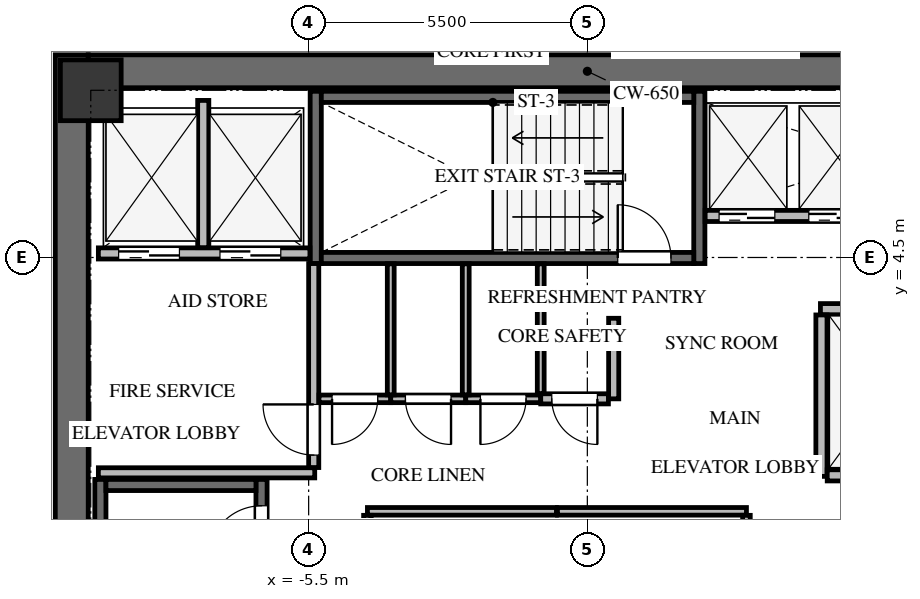
"""IFC4 building model, lengths in metres.
Left out: names, types, materials, properties, quantities, classifications, styles, units other than length and angle.
Written with IfcOpenShell. Run it as: python <this file> out.ifc"""

import sys

from ifc_helpers import new_model, si_unit, direction, frame, frame_2d, origin, origin_2d, place, context, subcontext, project, spatial, rectangle, extrude, source, transform, mapped, element, fill, save


model = new_model("IFC4")
c1 = context("Model", 3, precision=1e-05, world=origin(), true_north=direction((0.0, 1.0)))
c2 = subcontext(c1, "Body", "Model", "MODEL_VIEW")
j1 = project(units=[si_unit("LENGTHUNIT", "METRE"), si_unit("PLANEANGLEUNIT", "RADIAN")], contexts=[c1])
p1 = place(None, origin())
s1 = spatial("IfcSite", under=j1, at=p1, CompositionType="ELEMENT")
p2 = place(p1, origin())
s2 = spatial("IfcBuilding", under=s1, at=p2, CompositionType="ELEMENT")
p3 = place(p2, frame((0.0, 0.0, 193.6)))
s3 = spatial("IfcBuildingStorey", under=s2, at=p3, CompositionType="ELEMENT", Elevation=193.6)
p4 = place(p3, frame((-10.175, -8.5, 0.0), z_axis=(0.0, 0.0, 1.0), x_axis=(0.0, 1.0, 0.0)))
e1 = element("IfcWall", 1, at=p4, inside=s3, PredefinedType="SHEAR", context=c2, shape_type="SweptSolid", body=[
    extrude(rectangle(XDim=17.0, YDim=0.65, at=frame_2d((8.5, 0.0))), origin(), (0.0, 0.0, 1.0), 3.3),
])
p5 = place(p3, frame((-9.85, 8.175, 0.0), z_axis=(0.0, 0.0, 1.0), x_axis=(1.0, 0.0, 0.0)))
e2 = element("IfcWall", 2, at=p5, inside=s3, PredefinedType="SHEAR", context=c2, shape_type="SweptSolid", body=[
    extrude(rectangle(XDim=19.7, YDim=0.65, at=frame_2d((9.85, 0.0))), origin(), (0.0, 0.0, 1.0), 3.3),
])
p6 = place(p3, frame((-6.43, -7.77, -0.24), z_axis=(0.0, 0.0, 1.0), x_axis=(0.0, 1.0, 0.0)))
e3 = element("IfcWall", 3, at=p6, inside=s3, PredefinedType="SHEAR", context=c2, shape_type="SweptSolid", body=[
    extrude(rectangle(XDim=7.89, YDim=0.22, at=frame_2d((3.945, 0.0))), origin(), (0.0, 0.0, 1.0), 3.3),
])
p7 = place(p6, frame((6.32, 0.0, 0.0)))
e4 = element("IfcOpeningElement", 4, at=p7, cuts=e3, PredefinedType="OPENING", context=c2, shape_type="SweptSolid", body=[
    extrude(rectangle(XDim=1.05, YDim=2.15, at=frame_2d((0.525, 1.075))), frame((0.0, 0.12, 0.0), z_axis=(0.0, -1.0, 0.0), x_axis=(1.0, 0.0, 0.0)), (0.0, 0.0, 1.0), 0.24),
])
p8 = place(p3, frame((-9.61, 0.12, -0.24), z_axis=(0.0, 0.0, 1.0), x_axis=(0.0, -1.0, 0.0)))
e5 = element("IfcWall", 5, at=p8, inside=s3, PredefinedType="SHEAR", context=c2, shape_type="SweptSolid", body=[
    extrude(rectangle(XDim=7.89, YDim=0.22, at=frame_2d((3.945, 0.0))), origin(), (0.0, 0.0, 1.0), 3.3),
])
p9 = place(p3, frame((-6.54, 0.01, -0.24), z_axis=(0.0, 0.0, 1.0), x_axis=(-1.0, 0.0, 0.0)))
e6 = element("IfcWall", 6, at=p9, inside=s3, PredefinedType="SHEAR", context=c2, shape_type="SweptSolid", body=[
    extrude(rectangle(XDim=2.96, YDim=0.22, at=frame_2d((1.48, 0.0))), origin(), (0.0, 0.0, 1.0), 3.3),
])
for number, where, z_axis, x_axis in (
    (7, (2.21, 4.38, -0.24), (0.0, 0.0, 1.0), (0.0, 1.0, 0.0)),
    (8, (-5.36, 7.78, -0.24), (0.0, 0.0, 1.0), (0.0, -1.0, 0.0)),
):
    element("IfcWall", number, at=place(p3, frame(where, z_axis=z_axis, x_axis=x_axis)), inside=s3, PredefinedType="SHEAR", context=c2, shape_type="SweptSolid", body=[
        extrude(rectangle(XDim=3.4, YDim=0.22, at=frame_2d((1.7, 0.0))), origin(), (0.0, 0.0, 1.0), 3.3),
    ])
p10 = place(p3, frame((-5.25, 4.49, -0.24), z_axis=(0.0, 0.0, 1.0), x_axis=(1.0, 0.0, 0.0)))
e9 = element("IfcWall", 9, at=p10, inside=s3, PredefinedType="SHEAR", context=c2, shape_type="SweptSolid", body=[
    extrude(rectangle(XDim=7.35, YDim=0.22, at=frame_2d((3.675, 0.0))), origin(), (0.0, 0.0, 1.0), 3.3),
])
p11 = place(p10, frame((5.85, 0.0, 0.0)))
e10 = element("IfcOpeningElement", 10, at=p11, cuts=e9, PredefinedType="OPENING", context=c2, shape_type="SweptSolid", body=[
    extrude(rectangle(XDim=1.05, YDim=2.15, at=frame_2d((0.525, 1.075))), frame((0.0, 0.12, 0.0), z_axis=(0.0, -1.0, 0.0), x_axis=(1.0, 0.0, 0.0)), (0.0, 0.0, 1.0), 0.24),
])
p12 = place(p3, frame((2.1, 7.67, -0.24), z_axis=(0.0, 0.0, 1.0), x_axis=(-1.0, 0.0, 0.0)))
e11 = element("IfcWall", 11, at=p12, inside=s3, PredefinedType="SHEAR", context=c2, shape_type="SweptSolid", body=[
    extrude(rectangle(XDim=7.35, YDim=0.22, at=frame_2d((3.675, 0.0))), origin(), (0.0, 0.0, 1.0), 3.3),
])
m1 = source(origin(), c2, "Body", "SweptSolid", [
    extrude(rectangle(XDim=1.2, YDim=1.2, at=origin_2d()), origin(), (0.0, 0.0, 1.0), 3.3),
])
p13 = place(p3, frame((-9.8, 7.8, -0.24), z_axis=(0.0, 0.0, 1.0), x_axis=(1.0, 0.0, 0.0)))
e12 = element("IfcColumn", 12, at=p13, inside=s3, PredefinedType="COLUMN", context=c2, shape_type="MappedRepresentation", body=[
    mapped(m1, transform((0.0, 0.0, 0.0), x_axis=(1.0, 0.0, 0.0), y_axis=(0.0, 1.0, 0.0), z_axis=(0.0, 0.0, 1.0), scale=1.0)),
])
p14 = place(p3, frame((-9.65, 4.58, 0.0), z_axis=(0.0, 0.0, 1.0), x_axis=(1.0, 0.0, 0.0)))
e13 = element("IfcWall", 13, at=p14, inside=s3, PredefinedType="SOLIDWALL", context=c2, shape_type="SweptSolid", body=[
    extrude(rectangle(XDim=4.175, YDim=0.22, at=frame_2d((2.087, 0.0))), origin(), (0.0, 0.0, 1.0), 3.045),
])
p15 = place(p14, frame((0.4, 0.0, 0.0)))
e14 = element("IfcOpeningElement", 14, at=p15, cuts=e13, PredefinedType="OPENING", context=c2, shape_type="SweptSolid", body=[
    extrude(rectangle(XDim=1.2, YDim=2.15, at=frame_2d((0.6, 1.075))), frame((0.0, 0.12, 0.0), z_axis=(0.0, -1.0, 0.0), x_axis=(1.0, 0.0, 0.0)), (0.0, 0.0, 1.0), 0.24),
])
p16 = place(p14, frame((2.4, 0.0, 0.0)))
e15 = element("IfcOpeningElement", 15, at=p16, cuts=e13, PredefinedType="OPENING", context=c2, shape_type="SweptSolid", body=[
    extrude(rectangle(XDim=1.2, YDim=2.15, at=frame_2d((0.6, 1.075))), frame((0.0, 0.12, 0.0), z_axis=(0.0, -1.0, 0.0), x_axis=(1.0, 0.0, 0.0)), (0.0, 0.0, 1.0), 0.24),
])
p17 = place(p3, frame((-7.58, 4.694, 0.0), z_axis=(0.0, 0.0, 1.0), x_axis=(0.0, 1.0, 0.0)))
e16 = element("IfcWall", 16, at=p17, inside=s3, PredefinedType="SOLIDWALL", context=c2, shape_type="SweptSolid", body=[
    extrude(rectangle(XDim=2.906, YDim=0.22, at=frame_2d((1.453, 0.0))), origin(), (0.0, 0.0, 1.0), 3.045),
])
p18 = place(p3, frame((-9.65, 0.25, 0.0), z_axis=(0.0, 0.0, 1.0), x_axis=(1.0, 0.0, 0.0)))
e17 = element("IfcWall", 17, at=p18, inside=s3, PredefinedType="SOLIDWALL", context=c2, shape_type="SweptSolid", body=[
    extrude(rectangle(XDim=4.27, YDim=0.2, at=frame_2d((2.135, 0.0))), origin(), (0.0, 0.0, 1.0), 3.045),
])
p19 = place(p3, frame((-5.4, 0.354, 0.0), z_axis=(0.0, 0.0, 1.0), x_axis=(0.0, 1.0, 0.0)))
e18 = element("IfcWall", 18, at=p19, inside=s3, PredefinedType="SOLIDWALL", context=c2, shape_type="SweptSolid", body=[
    extrude(rectangle(XDim=4.026, YDim=0.2, at=frame_2d((2.013, 0.0))), origin(), (0.0, 0.0, 1.0), 3.045),
])
p20 = place(p19, frame((0.246, 0.0, 0.0)))
e19 = element("IfcOpeningElement", 19, at=p20, cuts=e18, PredefinedType="OPENING", context=c2, shape_type="SweptSolid", body=[
    extrude(rectangle(XDim=1.0, YDim=2.15, at=frame_2d((0.5, 1.075))), frame((0.0, 0.11, 0.0), z_axis=(0.0, -1.0, 0.0), x_axis=(1.0, 0.0, 0.0)), (0.0, 0.0, 1.0), 0.22),
])
p21 = place(p3, frame((4.6, 3.48, 0.0), z_axis=(0.0, 0.0, 1.0), x_axis=(1.0, 0.0, 0.0)))
e20 = element("IfcWall", 20, at=p21, inside=s3, PredefinedType="SOLIDWALL", context=c2, shape_type="SweptSolid", body=[
    extrude(rectangle(XDim=5.05, YDim=0.22, at=frame_2d((2.525, 0.0))), origin(), (0.0, 0.0, 1.0), 3.045),
])
p22 = place(p21, frame((0.55, 0.0, 0.0)))
e21 = element("IfcOpeningElement", 21, at=p22, cuts=e20, PredefinedType="OPENING", context=c2, shape_type="SweptSolid", body=[
    extrude(rectangle(XDim=1.4, YDim=2.15, at=frame_2d((0.7, 1.075))), frame((0.0, 0.12, 0.0), z_axis=(0.0, -1.0, 0.0), x_axis=(1.0, 0.0, 0.0)), (0.0, 0.0, 1.0), 0.24),
])
p23 = place(p21, frame((3.05, 0.0, 0.0)))
e22 = element("IfcOpeningElement", 22, at=p23, cuts=e20, PredefinedType="OPENING", context=c2, shape_type="SweptSolid", body=[
    extrude(rectangle(XDim=1.4, YDim=2.15, at=frame_2d((0.7, 1.075))), frame((0.0, 0.12, 0.0), z_axis=(0.0, -1.0, 0.0), x_axis=(1.0, 0.0, 0.0)), (0.0, 0.0, 1.0), 0.24),
])
p24 = place(p3, frame((4.62, 0.18, 0.0), z_axis=(0.0, 0.0, 1.0), x_axis=(0.0, 1.0, 0.0)))
e23 = element("IfcWall", 23, at=p24, inside=s3, PredefinedType="SOLIDWALL", context=c2, shape_type="SweptSolid", body=[
    extrude(rectangle(XDim=3.186, YDim=0.22, at=frame_2d((1.593, 0.0))), origin(), (0.0, 0.0, 1.0), 3.045),
])
p25 = place(p3, frame((4.734, 0.2, 0.0), z_axis=(0.0, 0.0, 1.0), x_axis=(1.0, 0.0, 0.0)))
e24 = element("IfcWall", 24, at=p25, inside=s3, PredefinedType="SOLIDWALL", context=c2, shape_type="SweptSolid", body=[
    extrude(rectangle(XDim=1.666, YDim=0.22, at=frame_2d((0.833, 0.0))), origin(), (0.0, 0.0, 1.0), 3.045),
])
p26 = place(p3, frame((2.325, 5.32, 0.0), z_axis=(0.0, 0.0, 1.0), x_axis=(1.0, 0.0, 0.0)))
e25 = element("IfcWall", 25, at=p26, inside=s3, PredefinedType="SOLIDWALL", context=c2, shape_type="SweptSolid", body=[
    extrude(rectangle(XDim=7.325, YDim=0.22, at=frame_2d((3.663, 0.0))), origin(), (0.0, 0.0, 1.0), 3.045),
])
p27 = place(p26, frame((0.275, 0.0, 0.0)))
e26 = element("IfcOpeningElement", 26, at=p27, cuts=e25, PredefinedType="OPENING", context=c2, shape_type="SweptSolid", body=[
    extrude(rectangle(XDim=1.1, YDim=2.15, at=frame_2d((0.55, 1.075))), frame((0.0, 0.12, 0.0), z_axis=(0.0, -1.0, 0.0), x_axis=(1.0, 0.0, 0.0)), (0.0, 0.0, 1.0), 0.24),
])
p28 = place(p26, frame((2.045, 0.0, 0.0)))
e27 = element("IfcOpeningElement", 27, at=p28, cuts=e25, PredefinedType="OPENING", context=c2, shape_type="SweptSolid", body=[
    extrude(rectangle(XDim=1.1, YDim=2.15, at=frame_2d((0.55, 1.075))), frame((0.0, 0.12, 0.0), z_axis=(0.0, -1.0, 0.0), x_axis=(1.0, 0.0, 0.0)), (0.0, 0.0, 1.0), 0.24),
])
p29 = place(p26, frame((3.815, 0.0, 0.0)))
e28 = element("IfcOpeningElement", 28, at=p29, cuts=e25, PredefinedType="OPENING", context=c2, shape_type="SweptSolid", body=[
    extrude(rectangle(XDim=1.1, YDim=2.15, at=frame_2d((0.55, 1.075))), frame((0.0, 0.12, 0.0), z_axis=(0.0, -1.0, 0.0), x_axis=(1.0, 0.0, 0.0)), (0.0, 0.0, 1.0), 0.24),
])
p30 = place(p26, frame((5.585, 0.0, 0.0)))
e29 = element("IfcOpeningElement", 29, at=p30, cuts=e25, PredefinedType="OPENING", context=c2, shape_type="SweptSolid", body=[
    extrude(rectangle(XDim=1.1, YDim=2.15, at=frame_2d((0.55, 1.075))), frame((0.0, 0.12, 0.0), z_axis=(0.0, -1.0, 0.0), x_axis=(1.0, 0.0, 0.0)), (0.0, 0.0, 1.0), 0.24),
])
p31 = place(p3, frame((-4.34, -0.51, 0.0), z_axis=(0.0, 0.0, 1.0), x_axis=(1.0, 0.0, 0.0)))
e30 = element("IfcWall", 30, at=p31, inside=s3, PredefinedType="PARTITIONING", context=c2, shape_type="SweptSolid", body=[
    extrude(rectangle(XDim=3.73, YDim=0.15, at=frame_2d((1.865, 0.0))), origin(), (0.0, 0.0, 1.0), 3.045),
])
p32 = place(p3, frame((-4.34, -2.961, 0.0), z_axis=(0.0, 0.0, 1.0), x_axis=(0.0, 1.0, 0.0)))
e31 = element("IfcWall", 31, at=p32, inside=s3, PredefinedType="PARTITIONING", context=c2, shape_type="SweptSolid", body=[
    extrude(rectangle(XDim=2.372, YDim=0.15, at=frame_2d((1.186, 0.0))), origin(), (0.0, 0.0, 1.0), 3.045),
])
p33 = place(p3, frame((-0.59, -0.51, 0.0), z_axis=(0.0, 0.0, 1.0), x_axis=(1.0, 0.0, 0.0)))
e32 = element("IfcWall", 32, at=p33, inside=s3, PredefinedType="PARTITIONING", context=c2, shape_type="SweptSolid", body=[
    extrude(rectangle(XDim=3.73, YDim=0.15, at=frame_2d((1.865, 0.0))), origin(), (0.0, 0.0, 1.0), 3.045),
])
p34 = place(p3, frame((3.14, -0.589, 0.0), z_axis=(0.0, 0.0, 1.0), x_axis=(0.0, -1.0, 0.0)))
e33 = element("IfcWall", 33, at=p34, inside=s3, PredefinedType="PARTITIONING", context=c2, shape_type="SweptSolid", body=[
    extrude(rectangle(XDim=2.372, YDim=0.15, at=frame_2d((1.186, 0.0))), origin(), (0.0, 0.0, 1.0), 3.045),
])
p35 = place(p3, frame((-3.88, 1.71, 0.0), z_axis=(0.0, 0.0, 1.0), x_axis=(-1.0, 0.0, 0.0)))
e34 = element("IfcWall", 34, at=p35, inside=s3, PredefinedType="PARTITIONING", context=c2, shape_type="SweptSolid", body=[
    extrude(rectangle(XDim=1.416, YDim=0.15, at=frame_2d((0.708, 0.0))), origin(), (0.0, 0.0, 1.0), 3.045),
])
p36 = place(p35, frame((0.258, 0.0, 0.0)))
e35 = element("IfcOpeningElement", 35, at=p36, cuts=e34, PredefinedType="OPENING", context=c2, shape_type="SweptSolid", body=[
    extrude(rectangle(XDim=0.9, YDim=2.05, at=frame_2d((0.45, 1.025))), frame((0.0, 0.085, 0.0), z_axis=(0.0, -1.0, 0.0), x_axis=(1.0, 0.0, 0.0)), (0.0, 0.0, 1.0), 0.17),
])
p37 = place(p3, frame((-2.4, 1.71, 0.0), z_axis=(0.0, 0.0, 1.0), x_axis=(-1.0, 0.0, 0.0)))
e36 = element("IfcWall", 36, at=p37, inside=s3, PredefinedType="PARTITIONING", context=c2, shape_type="SweptSolid", body=[
    extrude(rectangle(XDim=1.48, YDim=0.15, at=frame_2d((0.74, 0.0))), origin(), (0.0, 0.0, 1.0), 3.045),
])
p38 = place(p37, frame((0.29, 0.0, 0.0)))
e37 = element("IfcOpeningElement", 37, at=p38, cuts=e36, PredefinedType="OPENING", context=c2, shape_type="SweptSolid", body=[
    extrude(rectangle(XDim=0.9, YDim=2.05, at=frame_2d((0.45, 1.025))), frame((0.0, 0.085, 0.0), z_axis=(0.0, -1.0, 0.0), x_axis=(1.0, 0.0, 0.0)), (0.0, 0.0, 1.0), 0.17),
])
p39 = place(p3, frame((-0.92, 1.71, 0.0), z_axis=(0.0, 0.0, 1.0), x_axis=(-1.0, 0.0, 0.0)))
e38 = element("IfcWall", 38, at=p39, inside=s3, PredefinedType="PARTITIONING", context=c2, shape_type="SweptSolid", body=[
    extrude(rectangle(XDim=1.48, YDim=0.15, at=frame_2d((0.74, 0.0))), origin(), (0.0, 0.0, 1.0), 3.045),
])
p40 = place(p39, frame((0.29, 0.0, 0.0)))
e39 = element("IfcOpeningElement", 39, at=p40, cuts=e38, PredefinedType="OPENING", context=c2, shape_type="SweptSolid", body=[
    extrude(rectangle(XDim=0.9, YDim=2.05, at=frame_2d((0.45, 1.025))), frame((0.0, 0.085, 0.0), z_axis=(0.0, -1.0, 0.0), x_axis=(1.0, 0.0, 0.0)), (0.0, 0.0, 1.0), 0.17),
])
p41 = place(p3, frame((0.52, 3.3, 0.0), z_axis=(0.0, 0.0, 1.0), x_axis=(0.0, -1.0, 0.0)))
e40 = element("IfcWall", 40, at=p41, inside=s3, PredefinedType="SOLIDWALL", context=c2, shape_type="SweptSolid", body=[
    extrude(rectangle(XDim=1.59, YDim=0.2, at=frame_2d((0.795, 0.0))), origin(), (0.0, 0.0, 1.0), 3.045),
])
p42 = place(p3, frame((0.416, 1.71, 0.0), z_axis=(0.0, 0.0, 1.0), x_axis=(-1.0, 0.0, 0.0)))
e41 = element("IfcWall", 41, at=p42, inside=s3, PredefinedType="SOLIDWALL", context=c2, shape_type="SweptSolid", body=[
    extrude(rectangle(XDim=1.336, YDim=0.2, at=frame_2d((0.668, 0.0))), origin(), (0.0, 0.0, 1.0), 3.045),
])
p43 = place(p42, frame((0.218, 0.0, 0.0)))
e42 = element("IfcOpeningElement", 42, at=p43, cuts=e41, PredefinedType="OPENING", context=c2, shape_type="SweptSolid", body=[
    extrude(rectangle(XDim=0.9, YDim=2.05, at=frame_2d((0.45, 1.025))), frame((0.0, 0.11, 0.0), z_axis=(0.0, -1.0, 0.0), x_axis=(1.0, 0.0, 0.0)), (0.0, 0.0, 1.0), 0.22),
])
for number, where, z_axis, x_axis in (
    (43, (-3.88, 4.375, 0.0), (0.0, 0.0, 1.0), (0.0, -1.0, 0.0)),
    (44, (-2.4, 4.375, 0.0), (0.0, 0.0, 1.0), (0.0, -1.0, 0.0)),
):
    element("IfcWall", number, at=place(p3, frame(where, z_axis=z_axis, x_axis=x_axis)), inside=s3, PredefinedType="PARTITIONING", context=c2, shape_type="SweptSolid", body=[
        extrude(rectangle(XDim=2.586, YDim=0.135, at=frame_2d((1.293, 0.0))), origin(), (0.0, 0.0, 1.0), 3.045),
    ])
p44 = place(p3, frame((-0.92, 4.375, 0.0), z_axis=(0.0, 0.0, 1.0), x_axis=(0.0, -1.0, 0.0)))
e45 = element("IfcWall", 45, at=p44, inside=s3, PredefinedType="PARTITIONING", context=c2, shape_type="SweptSolid", body=[
    extrude(rectangle(XDim=2.561, YDim=0.135, at=frame_2d((1.281, 0.0))), origin(), (0.0, 0.0, 1.0), 3.045),
])
m2 = source(origin(), c2, "Body", "SweptSolid", [
    extrude(rectangle(XDim=1.05, YDim=2.15, at=frame_2d((0.525, 1.075))), frame((0.0, 0.025, 0.0), z_axis=(0.0, -1.0, 0.0), x_axis=(1.0, 0.0, 0.0)), (0.0, 0.0, 1.0), 0.05),
])
p45 = place(p7, origin())
e46 = element("IfcDoor", 46, at=p45, inside=s3, OperationType="SINGLE_SWING_LEFT", PredefinedType="DOOR", context=c2, shape_type="MappedRepresentation", body=[
    mapped(m2, transform((0.0, 0.0, 0.0), x_axis=(1.0, 0.0, 0.0), y_axis=(0.0, 1.0, 0.0), z_axis=(0.0, 0.0, 1.0), scale=1.0)),
])
fill(e4, e46)
p46 = place(p11, origin())
e47 = element("IfcDoor", 47, at=p46, inside=s3, OperationType="SINGLE_SWING_LEFT", PredefinedType="DOOR", context=c2, shape_type="MappedRepresentation", body=[
    mapped(m2, transform((0.0, 0.0, 0.0), x_axis=(1.0, 0.0, 0.0), y_axis=(0.0, 1.0, 0.0), z_axis=(0.0, 0.0, 1.0), scale=1.0)),
])
fill(e10, e47)
m3 = source(origin(), c2, "Body", "SweptSolid", [
    extrude(rectangle(XDim=1.2, YDim=2.15, at=frame_2d((0.6, 1.075))), frame((0.0, 0.025, 0.0), z_axis=(0.0, -1.0, 0.0), x_axis=(1.0, 0.0, 0.0)), (0.0, 0.0, 1.0), 0.05),
])
p47 = place(p15, origin())
e48 = element("IfcDoor", 48, at=p47, inside=s3, OperationType="DOUBLE_DOOR_SLIDING", PredefinedType="DOOR", context=c2, shape_type="MappedRepresentation", body=[
    mapped(m3, transform((0.0, 0.0, 0.0), x_axis=(1.0, 0.0, 0.0), y_axis=(0.0, 1.0, 0.0), z_axis=(0.0, 0.0, 1.0), scale=1.0)),
])
fill(e14, e48)
p48 = place(p16, origin())
e49 = element("IfcDoor", 49, at=p48, inside=s3, OperationType="DOUBLE_DOOR_SLIDING", PredefinedType="DOOR", context=c2, shape_type="MappedRepresentation", body=[
    mapped(m3, transform((0.0, 0.0, 0.0), x_axis=(1.0, 0.0, 0.0), y_axis=(0.0, 1.0, 0.0), z_axis=(0.0, 0.0, 1.0), scale=1.0)),
])
fill(e15, e49)
m4 = source(origin(), c2, "Body", "SweptSolid", [
    extrude(rectangle(XDim=1.0, YDim=2.15, at=frame_2d((0.5, 1.075))), frame((0.0, 0.025, 0.0), z_axis=(0.0, -1.0, 0.0), x_axis=(1.0, 0.0, 0.0)), (0.0, 0.0, 1.0), 0.05),
])
p49 = place(p20, origin())
e50 = element("IfcDoor", 50, at=p49, inside=s3, OperationType="SINGLE_SWING_RIGHT", PredefinedType="DOOR", context=c2, shape_type="MappedRepresentation", body=[
    mapped(m4, transform((0.0, 0.0, 0.0), x_axis=(1.0, 0.0, 0.0), y_axis=(0.0, 1.0, 0.0), z_axis=(0.0, 0.0, 1.0), scale=1.0)),
])
fill(e19, e50)
m5 = source(origin(), c2, "Body", "SweptSolid", [
    extrude(rectangle(XDim=1.1, YDim=2.15, at=frame_2d((0.55, 1.075))), frame((0.0, 0.025, 0.0), z_axis=(0.0, -1.0, 0.0), x_axis=(1.0, 0.0, 0.0)), (0.0, 0.0, 1.0), 0.05),
])
p50 = place(p27, origin())
e51 = element("IfcDoor", 51, at=p50, inside=s3, OperationType="DOUBLE_DOOR_SLIDING", PredefinedType="DOOR", context=c2, shape_type="MappedRepresentation", body=[
    mapped(m5, transform((0.0, 0.0, 0.0), x_axis=(1.0, 0.0, 0.0), y_axis=(0.0, 1.0, 0.0), z_axis=(0.0, 0.0, 1.0), scale=1.0)),
])
fill(e26, e51)
p51 = place(p28, origin())
e52 = element("IfcDoor", 52, at=p51, inside=s3, OperationType="DOUBLE_DOOR_SLIDING", PredefinedType="DOOR", context=c2, shape_type="MappedRepresentation", body=[
    mapped(m5, transform((0.0, 0.0, 0.0), x_axis=(1.0, 0.0, 0.0), y_axis=(0.0, 1.0, 0.0), z_axis=(0.0, 0.0, 1.0), scale=1.0)),
])
fill(e27, e52)
m6 = source(origin(), c2, "Body", "SweptSolid", [
    extrude(rectangle(XDim=0.9, YDim=2.05, at=frame_2d((0.45, 1.025))), frame((0.0, 0.025, 0.0), z_axis=(0.0, -1.0, 0.0), x_axis=(1.0, 0.0, 0.0)), (0.0, 0.0, 1.0), 0.05),
])
p52 = place(p36, origin())
e53 = element("IfcDoor", 53, at=p52, inside=s3, OperationType="SINGLE_SWING_RIGHT", PredefinedType="DOOR", context=c2, shape_type="MappedRepresentation", body=[
    mapped(m6, transform((0.0, 0.0, 0.0), x_axis=(1.0, 0.0, 0.0), y_axis=(0.0, 1.0, 0.0), z_axis=(0.0, 0.0, 1.0), scale=1.0)),
])
fill(e35, e53)
m7 = source(origin(), c2, "Body", "SweptSolid", [
    extrude(rectangle(XDim=0.9, YDim=2.05, at=frame_2d((0.45, 1.025))), frame((0.0, 0.025, 0.0), z_axis=(0.0, -1.0, 0.0), x_axis=(1.0, 0.0, 0.0)), (0.0, 0.0, 1.0), 0.05),
])
p53 = place(p38, origin())
e54 = element("IfcDoor", 54, at=p53, inside=s3, OperationType="SINGLE_SWING_LEFT", PredefinedType="DOOR", context=c2, shape_type="MappedRepresentation", body=[
    mapped(m7, transform((0.0, 0.0, 0.0), x_axis=(1.0, 0.0, 0.0), y_axis=(0.0, 1.0, 0.0), z_axis=(0.0, 0.0, 1.0), scale=1.0)),
])
fill(e37, e54)
p54 = place(p40, origin())
e55 = element("IfcDoor", 55, at=p54, inside=s3, OperationType="SINGLE_SWING_RIGHT", PredefinedType="DOOR", context=c2, shape_type="MappedRepresentation", body=[
    mapped(m6, transform((0.0, 0.0, 0.0), x_axis=(1.0, 0.0, 0.0), y_axis=(0.0, 1.0, 0.0), z_axis=(0.0, 0.0, 1.0), scale=1.0)),
])
fill(e39, e55)
p55 = place(p43, origin())
e56 = element("IfcDoor", 56, at=p55, inside=s3, OperationType="SINGLE_SWING_LEFT", PredefinedType="DOOR", context=c2, shape_type="MappedRepresentation", body=[
    mapped(m7, transform((0.0, 0.0, 0.0), x_axis=(1.0, 0.0, 0.0), y_axis=(0.0, 1.0, 0.0), z_axis=(0.0, 0.0, 1.0), scale=1.0)),
])
fill(e42, e56)
save(model, sys.argv[1])
